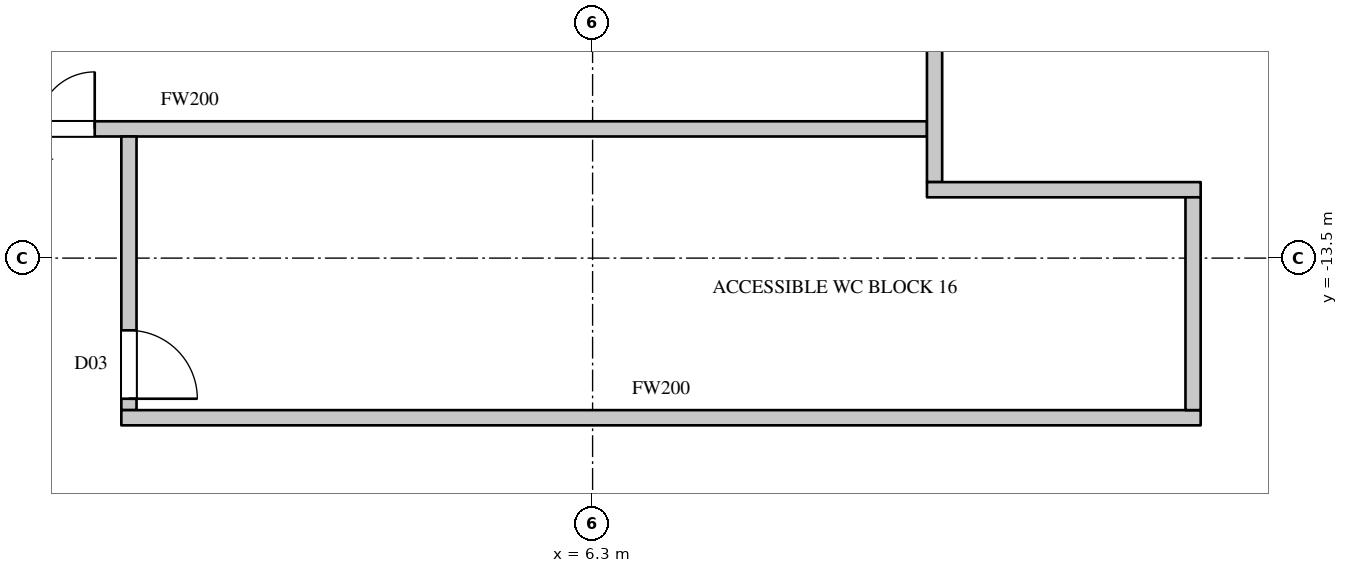
"""IFC4 building model, lengths in metres.
Left out: names, types, materials, properties, quantities, classifications, styles, units other than length and angle.
Written with IfcOpenShell. Run it as: python <this file> out.ifc"""

import sys

from ifc_helpers import new_model, si_unit, direction, frame, frame_2d, origin, place, context, subcontext, project, spatial, rectangle, extrude, element, fill, save


model = new_model("IFC4")
c1 = context("Model", 3, precision=1e-05, world=origin(), true_north=direction((0.0, 1.0)))
c2 = subcontext(c1, "Body", "Model", "MODEL_VIEW")
j1 = project(units=[si_unit("LENGTHUNIT", "METRE"), si_unit("PLANEANGLEUNIT", "RADIAN")], contexts=[c1])
p1 = place(None, origin())
s1 = spatial("IfcSite", under=j1, at=p1, CompositionType="ELEMENT")
p2 = place(p1, origin())
s2 = spatial("IfcBuilding", under=s1, at=p2, CompositionType="ELEMENT")
p3 = place(p2, frame((0.0, 0.0, 87.9)))
s3 = spatial("IfcBuildingStorey", under=s2, at=p3, CompositionType="ELEMENT", Elevation=87.9)
p4 = place(p3, frame((-8.7, -11.8, 0.0), z_axis=(0.0, 0.0, 1.0), x_axis=(1.0, 0.0, 0.0)))
e1 = element("IfcWall", 1, at=p4, inside=s3, PredefinedType="PARTITIONING", context=c2, shape_type="SweptSolid", body=[
    extrude(rectangle(XDim=19.4, YDim=0.2, at=frame_2d((9.7, 0.0))), origin(), (0.0, 0.0, 1.0), 3.3),
])
p5 = place(p4, frame((6.95, 0.0, 0.0)))
e2 = element("IfcOpeningElement", 2, at=p5, cuts=e1, PredefinedType="OPENING", context=c2, shape_type="SweptSolid", body=[
    extrude(rectangle(XDim=1.5, YDim=2.2, at=frame_2d((0.75, 1.1))), frame((0.0, 0.11, 0.0), z_axis=(0.0, -1.0, 0.0), x_axis=(1.0, 0.0, 0.0)), (0.0, 0.0, 1.0), 0.22),
])
p6 = place(p3, frame((0.2, -15.5, 0.0), z_axis=(0.0, 0.0, 1.0), x_axis=(0.0, 1.0, 0.0)))
e3 = element("IfcWall", 3, at=p6, inside=s3, PredefinedType="PARTITIONING", context=c2, shape_type="SweptSolid", body=[
    extrude(rectangle(XDim=3.6, YDim=0.2, at=frame_2d((1.8, 0.0))), origin(), (0.0, 0.0, 1.0), 3.3),
])
p7 = place(p6, frame((0.15, 0.0, 0.0)))
e4 = element("IfcOpeningElement", 4, at=p7, cuts=e3, PredefinedType="OPENING", context=c2, shape_type="SweptSolid", body=[
    extrude(rectangle(XDim=0.9, YDim=2.2, at=frame_2d((0.45, 1.1))), frame((0.0, 0.11, 0.0), z_axis=(0.0, -1.0, 0.0), x_axis=(1.0, 0.0, 0.0)), (0.0, 0.0, 1.0), 0.22),
])
p8 = place(p3, frame((0.1, -15.6, 0.0), z_axis=(0.0, 0.0, 1.0), x_axis=(1.0, 0.0, 0.0)))
e5 = element("IfcWall", 5, at=p8, inside=s3, PredefinedType="PARTITIONING", context=c2, shape_type="SweptSolid", body=[
    extrude(rectangle(XDim=14.2, YDim=0.2, at=frame_2d((7.1, 0.0))), origin(), (0.0, 0.0, 1.0), 3.3),
])
p9 = place(p3, frame((10.799, -12.5, 0.0), z_axis=(0.0, 0.0, 1.0), x_axis=(0.0, 1.0, 0.0)))
e6 = element("IfcWall", 6, at=p9, inside=s3, PredefinedType="PARTITIONING", context=c2, shape_type="SweptSolid", body=[
    extrude(rectangle(XDim=24.2, YDim=0.2, at=frame_2d((12.1, 0.0))), origin(), (0.0, 0.0, 1.0), 3.3),
])
p10 = place(p9, frame((13.15, 0.0, 0.0)))
e7 = element("IfcOpeningElement", 7, at=p10, cuts=e6, PredefinedType="OPENING", context=c2, shape_type="SweptSolid", body=[
    extrude(rectangle(XDim=1.5, YDim=2.2, at=frame_2d((0.75, 1.1))), frame((0.0, 0.11, 0.0), z_axis=(0.0, -1.0, 0.0), x_axis=(1.0, 0.0, 0.0)), (0.0, 0.0, 1.0), 0.22),
])
p11 = place(p3, frame((10.699, -12.6, 0.0), z_axis=(0.0, 0.0, 1.0), x_axis=(1.0, 0.0, 0.0)))
e8 = element("IfcWall", 8, at=p11, inside=s3, PredefinedType="PARTITIONING", context=c2, shape_type="SweptSolid", body=[
    extrude(rectangle(XDim=3.601, YDim=0.2, at=frame_2d((1.801, 0.0))), origin(), (0.0, 0.0, 1.0), 3.3),
])
p12 = place(p3, frame((14.2, -15.5, 0.0), z_axis=(0.0, 0.0, 1.0), x_axis=(0.0, 1.0, 0.0)))
e9 = element("IfcWall", 9, at=p12, inside=s3, PredefinedType="PARTITIONING", context=c2, shape_type="SweptSolid", body=[
    extrude(rectangle(XDim=2.8, YDim=0.2, at=frame_2d((1.4, 0.0))), origin(), (0.0, 0.0, 1.0), 3.3),
])
p13 = place(p5, origin())
e10 = element("IfcDoor", 10, at=p13, inside=s3, OperationType="DOUBLE_DOOR_SINGLE_SWING", PredefinedType="DOOR", context=c2, shape_type="SweptSolid", body=[
    extrude(rectangle(XDim=1.5, YDim=2.2, at=frame_2d((0.75, 1.1))), frame((0.0, 0.025, 0.0), z_axis=(0.0, -1.0, 0.0), x_axis=(1.0, 0.0, 0.0)), (0.0, 0.0, 1.0), 0.05),
])
fill(e2, e10)
p14 = place(p7, origin())
e11 = element("IfcDoor", 11, at=p14, inside=s3, OperationType="SINGLE_SWING_RIGHT", PredefinedType="DOOR", context=c2, shape_type="SweptSolid", body=[
    extrude(rectangle(XDim=0.9, YDim=2.2, at=frame_2d((0.45, 1.1))), frame((0.0, 0.025, 0.0), z_axis=(0.0, -1.0, 0.0), x_axis=(1.0, 0.0, 0.0)), (0.0, 0.0, 1.0), 0.05),
])
fill(e4, e11)
save(model, sys.argv[1])
